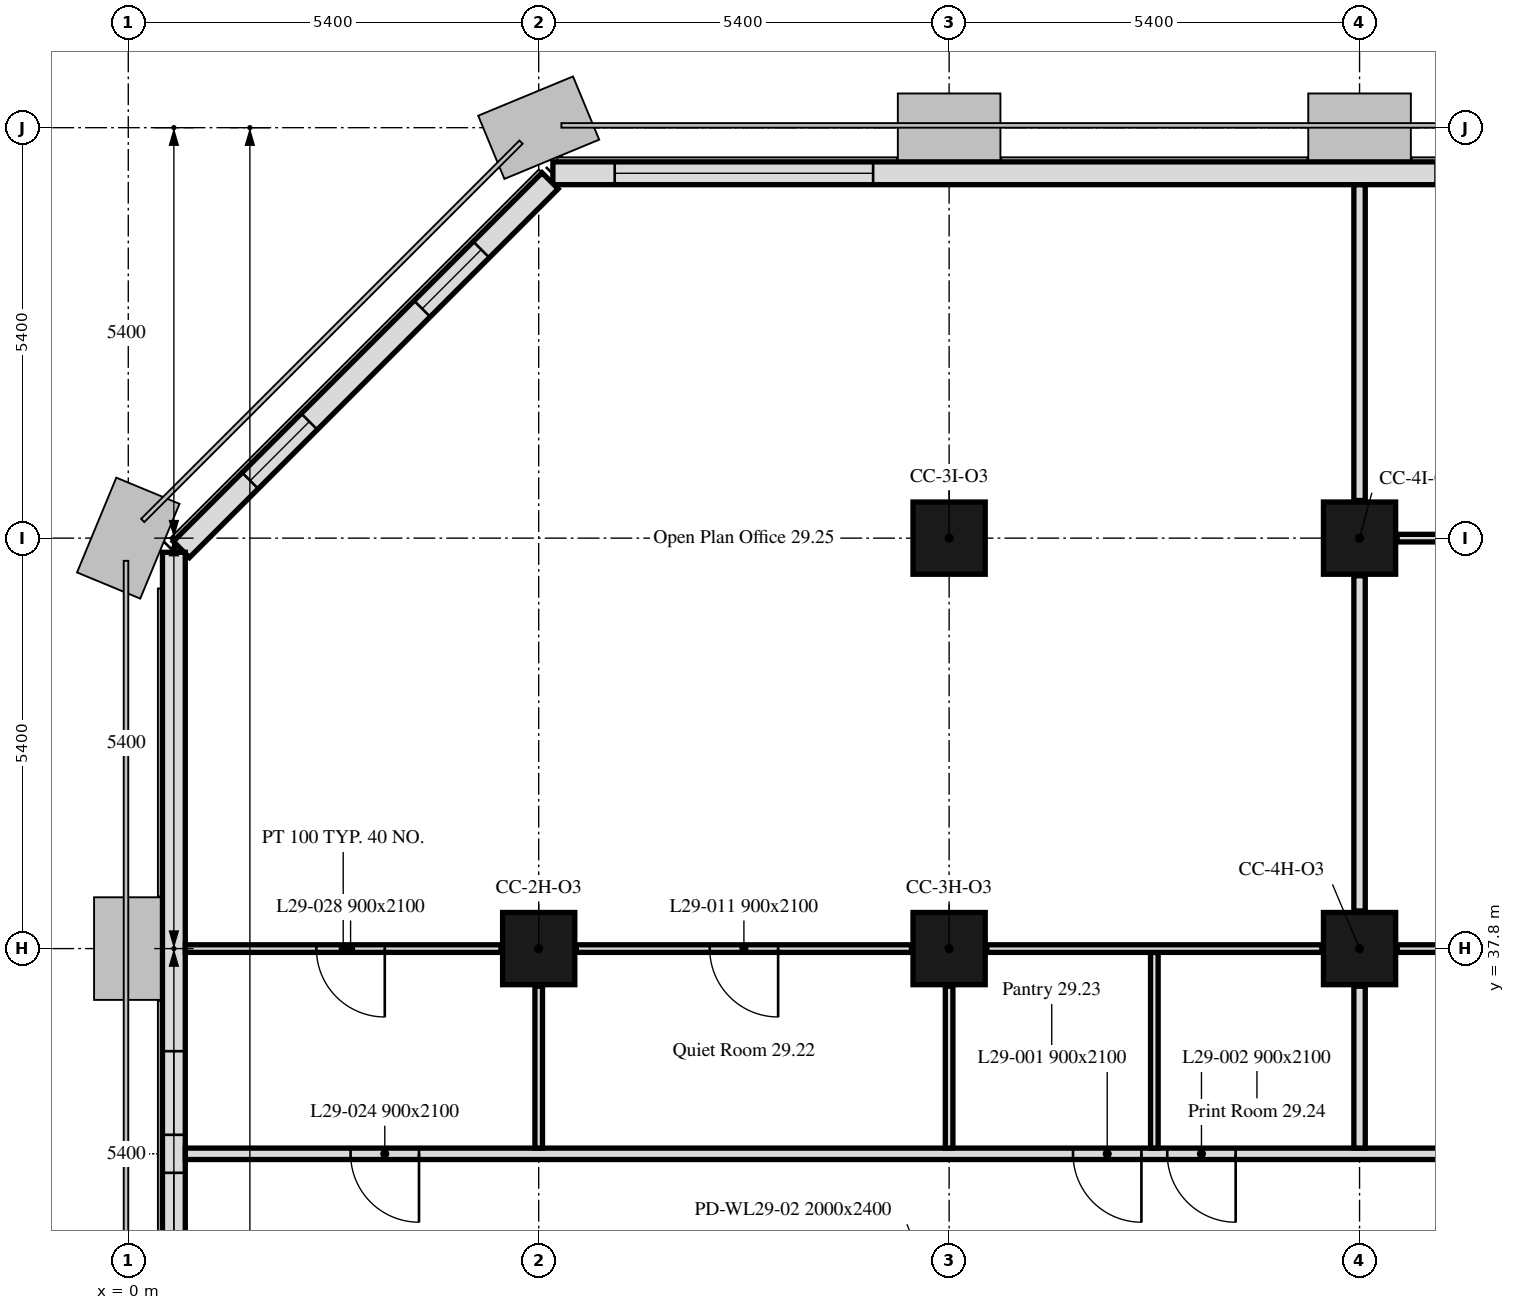
"""IFC4 building model, lengths in metres.
Left out: names, types, materials, properties, quantities, classifications, styles, units other than length and angle.
Written with IfcOpenShell. Run it as: python <this file> out.ifc"""

import sys

from ifc_helpers import new_model, si_unit, direction, frame, frame_2d, origin, origin_2d, place, context, subcontext, project, spatial, rectangle, extrude, element, fill, save


model = new_model("IFC4")
c1 = context("Model", 3, precision=1e-05, world=origin(), true_north=direction((0.0, 1.0)))
c2 = subcontext(c1, "Body", "Model", "MODEL_VIEW")
j1 = project(units=[si_unit("LENGTHUNIT", "METRE"), si_unit("PLANEANGLEUNIT", "RADIAN")], contexts=[c1])
p1 = place(None, origin())
s1 = spatial("IfcSite", under=j1, at=p1, CompositionType="ELEMENT")
p2 = place(p1, origin())
s2 = spatial("IfcBuilding", under=s1, at=p2, CompositionType="ELEMENT")
p3 = place(p2, frame((0.0, 0.0, 122.0)))
s3 = spatial("IfcBuildingStorey", under=s2, at=p3, CompositionType="ELEMENT", Elevation=122.0)
for number, where, z_axis, x_axis in (
    (1, (5.4, 37.8, 0.0), (0.0, 0.0, 1.0), (1.0, 0.0, 0.0)),
    (2, (10.8, 37.8, 0.0), (0.0, 0.0, 1.0), (1.0, 0.0, 0.0)),
    (3, (16.2, 37.8, 0.0), (0.0, 0.0, 1.0), (1.0, 0.0, 0.0)),
    (4, (10.8, 43.2, 0.0), (0.0, 0.0, 1.0), (1.0, 0.0, 0.0)),
    (5, (16.2, 43.2, 0.0), (0.0, 0.0, 1.0), (1.0, 0.0, 0.0)),
):
    element("IfcColumn", number, at=place(p3, frame(where, z_axis=z_axis, x_axis=x_axis)), inside=s3, PredefinedType="COLUMN", context=c2, shape_type="SweptSolid", body=[
        extrude(rectangle(XDim=0.95, YDim=0.95, at=origin_2d()), origin(), (0.0, 0.0, 1.0), 3.3),
    ])
p4 = place(p3, frame((37.614, 48.0, 0.0), z_axis=(0.0, 0.0, 1.0), x_axis=(-1.0, 0.0, 0.0)))
e6 = element("IfcWall", 6, at=p4, inside=s3, PredefinedType="SOLIDWALL", context=c2, shape_type="SweptSolid", body=[
    extrude(rectangle(XDim=32.027, YDim=0.3, at=frame_2d((16.014, 0.0))), origin(), (0.0, 0.0, 1.0), 3.3),
])
p5 = place(p4, frame((6.214, 0.0, 0.9)))
e7 = element("IfcOpeningElement", 7, at=p5, cuts=e6, PredefinedType="OPENING", context=c2, shape_type="SweptSolid", body=[
    extrude(rectangle(XDim=3.4, YDim=1.7, at=frame_2d((1.7, 0.85))), frame((0.0, 0.16, 0.0), z_axis=(0.0, -1.0, 0.0), x_axis=(1.0, 0.0, 0.0)), (0.0, 0.0, 1.0), 0.32),
])
p6 = place(p4, frame((17.014, 0.0, 0.9)))
e8 = element("IfcOpeningElement", 8, at=p6, cuts=e6, PredefinedType="OPENING", context=c2, shape_type="SweptSolid", body=[
    extrude(rectangle(XDim=3.4, YDim=1.7, at=frame_2d((1.7, 0.85))), frame((0.0, 0.16, 0.0), z_axis=(0.0, -1.0, 0.0), x_axis=(1.0, 0.0, 0.0)), (0.0, 0.0, 1.0), 0.32),
])
p7 = place(p4, frame((27.814, 0.0, 0.9)))
e9 = element("IfcOpeningElement", 9, at=p7, cuts=e6, PredefinedType="OPENING", context=c2, shape_type="SweptSolid", body=[
    extrude(rectangle(XDim=3.4, YDim=1.7, at=frame_2d((1.7, 0.85))), frame((0.0, 0.16, 0.0), z_axis=(0.0, -1.0, 0.0), x_axis=(1.0, 0.0, 0.0)), (0.0, 0.0, 1.0), 0.32),
])
p8 = place(p3, frame((5.55, 47.901, 0.0), z_axis=(0.0, 0.0, 1.0), x_axis=(-0.707106781187, -0.707106781187, 0.0)))
e10 = element("IfcWall", 10, at=p8, inside=s3, PredefinedType="SOLIDWALL", context=c2, shape_type="SweptSolid", body=[
    extrude(rectangle(XDim=6.86, YDim=0.3, at=frame_2d((3.43, 0.0))), origin(), (0.0, 0.0, 1.0), 3.3),
])
p9 = place(p8, frame((1.28, 0.0, 0.9)))
e11 = element("IfcOpeningElement", 11, at=p9, cuts=e10, PredefinedType="OPENING", context=c2, shape_type="SweptSolid", body=[
    extrude(rectangle(XDim=1.1, YDim=1.7, at=frame_2d((0.55, 0.85))), frame((0.0, 0.16, 0.0), z_axis=(0.0, -1.0, 0.0), x_axis=(1.0, 0.0, 0.0)), (0.0, 0.0, 1.0), 0.32),
])
p10 = place(p8, frame((4.48, 0.0, 0.9)))
e12 = element("IfcOpeningElement", 12, at=p10, cuts=e10, PredefinedType="OPENING", context=c2, shape_type="SweptSolid", body=[
    extrude(rectangle(XDim=1.1, YDim=1.7, at=frame_2d((0.55, 0.85))), frame((0.0, 0.16, 0.0), z_axis=(0.0, -1.0, 0.0), x_axis=(1.0, 0.0, 0.0)), (0.0, 0.0, 1.0), 0.32),
])
p11 = place(p3, frame((0.6, 43.014, 0.0), z_axis=(0.0, 0.0, 1.0), x_axis=(0.0, -1.0, 0.0)))
e13 = element("IfcWall", 13, at=p11, inside=s3, PredefinedType="SOLIDWALL", context=c2, shape_type="SweptSolid", body=[
    extrude(rectangle(XDim=32.027, YDim=0.3, at=frame_2d((16.014, 0.0))), origin(), (0.0, 0.0, 1.0), 3.3),
])
p12 = place(p11, frame((6.564, 0.0, 0.9)))
e14 = element("IfcOpeningElement", 14, at=p12, cuts=e13, PredefinedType="OPENING", context=c2, shape_type="SweptSolid", body=[
    extrude(rectangle(XDim=1.1, YDim=1.7, at=frame_2d((0.55, 0.85))), frame((0.0, 0.16, 0.0), z_axis=(0.0, -1.0, 0.0), x_axis=(1.0, 0.0, 0.0)), (0.0, 0.0, 1.0), 0.32),
])
p13 = place(p11, frame((8.164, 0.0, 0.9)))
e15 = element("IfcOpeningElement", 15, at=p13, cuts=e13, PredefinedType="OPENING", context=c2, shape_type="SweptSolid", body=[
    extrude(rectangle(XDim=1.1, YDim=1.7, at=frame_2d((0.55, 0.85))), frame((0.0, 0.16, 0.0), z_axis=(0.0, -1.0, 0.0), x_axis=(1.0, 0.0, 0.0)), (0.0, 0.0, 1.0), 0.32),
])
p14 = place(p11, frame((17.014, 0.0, 0.9)))
e16 = element("IfcOpeningElement", 16, at=p14, cuts=e13, PredefinedType="OPENING", context=c2, shape_type="SweptSolid", body=[
    extrude(rectangle(XDim=3.4, YDim=1.7, at=frame_2d((1.7, 0.85))), frame((0.0, 0.16, 0.0), z_axis=(0.0, -1.0, 0.0), x_axis=(1.0, 0.0, 0.0)), (0.0, 0.0, 1.0), 0.32),
])
p15 = place(p11, frame((28.164, 0.0, 0.9)))
e17 = element("IfcOpeningElement", 17, at=p15, cuts=e13, PredefinedType="OPENING", context=c2, shape_type="SweptSolid", body=[
    extrude(rectangle(XDim=1.1, YDim=1.7, at=frame_2d((0.55, 0.85))), frame((0.0, 0.16, 0.0), z_axis=(0.0, -1.0, 0.0), x_axis=(1.0, 0.0, 0.0)), (0.0, 0.0, 1.0), 0.32),
])
p16 = place(p11, frame((29.764, 0.0, 0.9)))
e18 = element("IfcOpeningElement", 18, at=p16, cuts=e13, PredefinedType="OPENING", context=c2, shape_type="SweptSolid", body=[
    extrude(rectangle(XDim=1.1, YDim=1.7, at=frame_2d((0.55, 0.85))), frame((0.0, 0.16, 0.0), z_axis=(0.0, -1.0, 0.0), x_axis=(1.0, 0.0, 0.0)), (0.0, 0.0, 1.0), 0.32),
])
p17 = place(p3, frame((42.449, 35.1, 0.0), z_axis=(0.0, 0.0, 1.0), x_axis=(-1.0, 0.0, 0.0)))
e19 = element("IfcWall", 19, at=p17, inside=s3, PredefinedType="PARTITIONING", context=c2, shape_type="SweptSolid", body=[
    extrude(rectangle(XDim=41.698, YDim=0.15, at=frame_2d((20.849, 0.0))), origin(), (0.0, 0.0, 1.0), 2.55),
])
p18 = place(p17, frame((29.119, 0.0, 0.0)))
e20 = element("IfcOpeningElement", 20, at=p18, cuts=e19, PredefinedType="OPENING", context=c2, shape_type="SweptSolid", body=[
    extrude(rectangle(XDim=0.9, YDim=2.1, at=frame_2d((0.45, 1.05))), frame((0.0, 0.075, 0.0), z_axis=(0.0, -1.0, 0.0), x_axis=(1.0, 0.0, 0.0)), (0.0, 0.0, 1.0), 0.15),
])
p19 = place(p17, frame((27.879, 0.0, 0.0)))
e21 = element("IfcOpeningElement", 21, at=p19, cuts=e19, PredefinedType="OPENING", context=c2, shape_type="SweptSolid", body=[
    extrude(rectangle(XDim=0.9, YDim=2.1, at=frame_2d((0.45, 1.05))), frame((0.0, 0.075, 0.0), z_axis=(0.0, -1.0, 0.0), x_axis=(1.0, 0.0, 0.0)), (0.0, 0.0, 1.0), 0.15),
])
p20 = place(p17, frame((18.319, 0.0, 0.0)))
e22 = element("IfcOpeningElement", 22, at=p20, cuts=e19, PredefinedType="OPENING", context=c2, shape_type="SweptSolid", body=[
    extrude(rectangle(XDim=0.9, YDim=2.1, at=frame_2d((0.45, 1.05))), frame((0.0, 0.075, 0.0), z_axis=(0.0, -1.0, 0.0), x_axis=(1.0, 0.0, 0.0)), (0.0, 0.0, 1.0), 0.15),
])
p21 = place(p17, frame((38.624, 0.0, 0.0)))
e23 = element("IfcOpeningElement", 23, at=p21, cuts=e19, PredefinedType="OPENING", context=c2, shape_type="SweptSolid", body=[
    extrude(rectangle(XDim=0.9, YDim=2.1, at=frame_2d((0.45, 1.05))), frame((0.0, 0.075, 0.0), z_axis=(0.0, -1.0, 0.0), x_axis=(1.0, 0.0, 0.0)), (0.0, 0.0, 1.0), 0.15),
])
p22 = place(p17, frame((23.099, 0.0, 0.0)))
e24 = element("IfcOpeningElement", 24, at=p22, cuts=e19, PredefinedType="OPENING", context=c2, shape_type="SweptSolid", body=[
    extrude(rectangle(XDim=0.9, YDim=2.1, at=frame_2d((0.45, 1.05))), frame((0.0, 0.075, 0.0), z_axis=(0.0, -1.0, 0.0), x_axis=(1.0, 0.0, 0.0)), (0.0, 0.0, 1.0), 0.15),
])
p23 = place(p17, frame((6.899, 0.0, 0.0)))
e25 = element("IfcOpeningElement", 25, at=p23, cuts=e19, PredefinedType="OPENING", context=c2, shape_type="SweptSolid", body=[
    extrude(rectangle(XDim=0.9, YDim=2.1, at=frame_2d((0.45, 1.05))), frame((0.0, 0.075, 0.0), z_axis=(0.0, -1.0, 0.0), x_axis=(1.0, 0.0, 0.0)), (0.0, 0.0, 1.0), 0.15),
])
p24 = place(p3, frame((4.905, 37.8, 0.0), z_axis=(0.0, 0.0, 1.0), x_axis=(-1.0, 0.0, 0.0)))
e26 = element("IfcWall", 26, at=p24, inside=s3, PredefinedType="PARTITIONING", context=c2, shape_type="SweptSolid", body=[
    extrude(rectangle(XDim=4.154, YDim=0.1, at=frame_2d((2.077, 0.0))), origin(), (0.0, 0.0, 1.0), 2.55),
])
p25 = place(p24, frame((1.53, 0.0, 0.0)))
e27 = element("IfcOpeningElement", 27, at=p25, cuts=e26, PredefinedType="OPENING", context=c2, shape_type="SweptSolid", body=[
    extrude(rectangle(XDim=0.9, YDim=2.1, at=frame_2d((0.45, 1.05))), frame((0.0, 0.05, 0.0), z_axis=(0.0, -1.0, 0.0), x_axis=(1.0, 0.0, 0.0)), (0.0, 0.0, 1.0), 0.1),
])
p26 = place(p3, frame((5.4, 35.175, 0.0), z_axis=(0.0, 0.0, 1.0), x_axis=(0.0, 1.0, 0.0)))
e28 = element("IfcWall", 28, at=p26, inside=s3, PredefinedType="PARTITIONING", context=c2, shape_type="SweptSolid", body=[
    extrude(rectangle(XDim=2.13, YDim=0.1, at=frame_2d((1.065, 0.0))), origin(), (0.0, 0.0, 1.0), 3.3),
])
p27 = place(p3, frame((10.8, 35.175, 0.0), z_axis=(0.0, 0.0, 1.0), x_axis=(0.0, 1.0, 0.0)))
e29 = element("IfcWall", 29, at=p27, inside=s3, PredefinedType="PARTITIONING", context=c2, shape_type="SweptSolid", body=[
    extrude(rectangle(XDim=2.13, YDim=0.1, at=frame_2d((1.065, 0.0))), origin(), (0.0, 0.0, 1.0), 2.55),
])
p28 = place(p3, frame((10.305, 37.8, 0.0), z_axis=(0.0, 0.0, 1.0), x_axis=(-1.0, 0.0, 0.0)))
e30 = element("IfcWall", 30, at=p28, inside=s3, PredefinedType="PARTITIONING", context=c2, shape_type="SweptSolid", body=[
    extrude(rectangle(XDim=4.41, YDim=0.1, at=frame_2d((2.205, 0.0))), origin(), (0.0, 0.0, 1.0), 2.55),
])
p29 = place(p28, frame((1.755, 0.0, 0.0)))
e31 = element("IfcOpeningElement", 31, at=p29, cuts=e30, PredefinedType="OPENING", context=c2, shape_type="SweptSolid", body=[
    extrude(rectangle(XDim=0.9, YDim=2.1, at=frame_2d((0.45, 1.05))), frame((0.0, 0.05, 0.0), z_axis=(0.0, -1.0, 0.0), x_axis=(1.0, 0.0, 0.0)), (0.0, 0.0, 1.0), 0.1),
])
p30 = place(p3, frame((13.5, 35.175, 0.0), z_axis=(0.0, 0.0, 1.0), x_axis=(0.0, 1.0, 0.0)))
e32 = element("IfcWall", 32, at=p30, inside=s3, PredefinedType="PARTITIONING", context=c2, shape_type="SweptSolid", body=[
    extrude(rectangle(XDim=2.575, YDim=0.1, at=frame_2d((1.288, 0.0))), origin(), (0.0, 0.0, 1.0), 3.3),
])
p31 = place(p3, frame((16.2, 35.175, 0.0), z_axis=(0.0, 0.0, 1.0), x_axis=(0.0, 1.0, 0.0)))
e33 = element("IfcWall", 33, at=p31, inside=s3, PredefinedType="PARTITIONING", context=c2, shape_type="SweptSolid", body=[
    extrude(rectangle(XDim=2.13, YDim=0.15, at=frame_2d((1.065, 0.0))), origin(), (0.0, 0.0, 1.0), 2.55),
])
p32 = place(p3, frame((15.705, 37.8, 0.0), z_axis=(0.0, 0.0, 1.0), x_axis=(-1.0, 0.0, 0.0)))
e34 = element("IfcWall", 34, at=p32, inside=s3, PredefinedType="PARTITIONING", context=c2, shape_type="SweptSolid", body=[
    extrude(rectangle(XDim=4.41, YDim=0.1, at=frame_2d((2.205, 0.0))), origin(), (0.0, 0.0, 1.0), 2.55),
])
p33 = place(p3, frame((16.2, 38.295, 0.0), z_axis=(0.0, 0.0, 1.0), x_axis=(0.0, 1.0, 0.0)))
e35 = element("IfcWall", 35, at=p33, inside=s3, PredefinedType="PARTITIONING", context=c2, shape_type="SweptSolid", body=[
    extrude(rectangle(XDim=4.41, YDim=0.15, at=frame_2d((2.205, 0.0))), origin(), (0.0, 0.0, 1.0), 2.55),
])
p34 = place(p3, frame((16.2, 43.695, 0.0), z_axis=(0.0, 0.0, 1.0), x_axis=(0.0, 1.0, 0.0)))
e36 = element("IfcWall", 36, at=p34, inside=s3, PredefinedType="PARTITIONING", context=c2, shape_type="SweptSolid", body=[
    extrude(rectangle(XDim=4.154, YDim=0.15, at=frame_2d((2.077, 0.0))), origin(), (0.0, 0.0, 1.0), 2.55),
])
p35 = place(p3, frame((21.105, 37.8, 0.0), z_axis=(0.0, 0.0, 1.0), x_axis=(-1.0, 0.0, 0.0)))
e37 = element("IfcWall", 37, at=p35, inside=s3, PredefinedType="PARTITIONING", context=c2, shape_type="SweptSolid", body=[
    extrude(rectangle(XDim=4.41, YDim=0.1, at=frame_2d((2.205, 0.0))), origin(), (0.0, 0.0, 1.0), 3.3),
])
p36 = place(p35, frame((1.755, 0.0, 0.0)))
e38 = element("IfcOpeningElement", 38, at=p36, cuts=e37, PredefinedType="OPENING", context=c2, shape_type="SweptSolid", body=[
    extrude(rectangle(XDim=0.9, YDim=2.1, at=frame_2d((0.45, 1.05))), frame((0.0, 0.05, 0.0), z_axis=(0.0, -1.0, 0.0), x_axis=(1.0, 0.0, 0.0)), (0.0, 0.0, 1.0), 0.1),
])
p37 = place(p3, frame((21.105, 43.2, 0.0), z_axis=(0.0, 0.0, 1.0), x_axis=(-1.0, 0.0, 0.0)))
e39 = element("IfcWall", 39, at=p37, inside=s3, PredefinedType="PARTITIONING", context=c2, shape_type="SweptSolid", body=[
    extrude(rectangle(XDim=4.41, YDim=0.1, at=frame_2d((2.205, 0.0))), origin(), (0.0, 0.0, 1.0), 3.3),
])
p38 = place(p37, frame((1.755, 0.0, 0.0)))
e40 = element("IfcOpeningElement", 40, at=p38, cuts=e39, PredefinedType="OPENING", context=c2, shape_type="SweptSolid", body=[
    extrude(rectangle(XDim=0.9, YDim=2.1, at=frame_2d((0.45, 1.05))), frame((0.0, 0.05, 0.0), z_axis=(0.0, -1.0, 0.0), x_axis=(1.0, 0.0, 0.0)), (0.0, 0.0, 1.0), 0.1),
])
p39 = place(p7, origin())
e41 = element("IfcWindow", 41, at=p39, inside=s3, PartitioningType="SINGLE_PANEL", PredefinedType="WINDOW", context=c2, shape_type="SweptSolid", body=[
    extrude(rectangle(XDim=3.4, YDim=1.7, at=frame_2d((1.7, 0.85))), frame((0.0, 0.03, 0.0), z_axis=(0.0, -1.0, 0.0), x_axis=(1.0, 0.0, 0.0)), (0.0, 0.0, 1.0), 0.06),
])
fill(e9, e41)
p40 = place(p9, origin())
e42 = element("IfcWindow", 42, at=p40, inside=s3, PartitioningType="SINGLE_PANEL", PredefinedType="WINDOW", context=c2, shape_type="SweptSolid", body=[
    extrude(rectangle(XDim=1.1, YDim=1.7, at=frame_2d((0.55, 0.85))), frame((0.0, 0.03, 0.0), z_axis=(0.0, -1.0, 0.0), x_axis=(1.0, 0.0, 0.0)), (0.0, 0.0, 1.0), 0.06),
])
fill(e11, e42)
p41 = place(p10, origin())
e43 = element("IfcWindow", 43, at=p41, inside=s3, PartitioningType="SINGLE_PANEL", PredefinedType="WINDOW", context=c2, shape_type="SweptSolid", body=[
    extrude(rectangle(XDim=1.1, YDim=1.7, at=frame_2d((0.55, 0.85))), frame((0.0, 0.03, 0.0), z_axis=(0.0, -1.0, 0.0), x_axis=(1.0, 0.0, 0.0)), (0.0, 0.0, 1.0), 0.06),
])
fill(e12, e43)
p42 = place(p12, origin())
e44 = element("IfcWindow", 44, at=p42, inside=s3, PartitioningType="SINGLE_PANEL", PredefinedType="WINDOW", context=c2, shape_type="SweptSolid", body=[
    extrude(rectangle(XDim=1.1, YDim=1.7, at=frame_2d((0.55, 0.85))), frame((0.0, 0.03, 0.0), z_axis=(0.0, -1.0, 0.0), x_axis=(1.0, 0.0, 0.0)), (0.0, 0.0, 1.0), 0.06),
])
fill(e14, e44)
p43 = place(p13, origin())
e45 = element("IfcWindow", 45, at=p43, inside=s3, PartitioningType="SINGLE_PANEL", PredefinedType="WINDOW", context=c2, shape_type="SweptSolid", body=[
    extrude(rectangle(XDim=1.1, YDim=1.7, at=frame_2d((0.55, 0.85))), frame((0.0, 0.03, 0.0), z_axis=(0.0, -1.0, 0.0), x_axis=(1.0, 0.0, 0.0)), (0.0, 0.0, 1.0), 0.06),
])
fill(e15, e45)
p44 = place(p18, origin())
e46 = element("IfcDoor", 46, at=p44, inside=s3, OperationType="SINGLE_SWING_LEFT", PredefinedType="DOOR", context=c2, shape_type="SweptSolid", body=[
    extrude(rectangle(XDim=0.9, YDim=2.1, at=frame_2d((0.45, 1.05))), frame((0.0, 0.025, 0.0), z_axis=(0.0, -1.0, 0.0), x_axis=(1.0, 0.0, 0.0)), (0.0, 0.0, 1.0), 0.05),
])
fill(e20, e46)
p45 = place(p19, origin())
e47 = element("IfcDoor", 47, at=p45, inside=s3, OperationType="SINGLE_SWING_LEFT", PredefinedType="DOOR", context=c2, shape_type="SweptSolid", body=[
    extrude(rectangle(XDim=0.9, YDim=2.1, at=frame_2d((0.45, 1.05))), frame((0.0, 0.025, 0.0), z_axis=(0.0, -1.0, 0.0), x_axis=(1.0, 0.0, 0.0)), (0.0, 0.0, 1.0), 0.05),
])
fill(e21, e47)
p46 = place(p29, origin())
e48 = element("IfcDoor", 48, at=p46, inside=s3, OperationType="SINGLE_SWING_LEFT", PredefinedType="DOOR", context=c2, shape_type="SweptSolid", body=[
    extrude(rectangle(XDim=0.9, YDim=2.1, at=frame_2d((0.45, 1.05))), frame((0.0, 0.025, 0.0), z_axis=(0.0, -1.0, 0.0), x_axis=(1.0, 0.0, 0.0)), (0.0, 0.0, 1.0), 0.05),
])
fill(e31, e48)
p47 = place(p21, origin())
e49 = element("IfcDoor", 49, at=p47, inside=s3, OperationType="SINGLE_SWING_LEFT", PredefinedType="DOOR", context=c2, shape_type="SweptSolid", body=[
    extrude(rectangle(XDim=0.9, YDim=2.1, at=frame_2d((0.45, 1.05))), frame((0.0, 0.025, 0.0), z_axis=(0.0, -1.0, 0.0), x_axis=(1.0, 0.0, 0.0)), (0.0, 0.0, 1.0), 0.05),
])
fill(e23, e49)
p48 = place(p25, origin())
e50 = element("IfcDoor", 50, at=p48, inside=s3, OperationType="SINGLE_SWING_RIGHT", PredefinedType="DOOR", context=c2, shape_type="SweptSolid", body=[
    extrude(rectangle(XDim=0.9, YDim=2.1, at=frame_2d((0.45, 1.05))), frame((0.0, 0.025, 0.0), z_axis=(0.0, -1.0, 0.0), x_axis=(1.0, 0.0, 0.0)), (0.0, 0.0, 1.0), 0.05),
])
fill(e27, e50)
save(model, sys.argv[1])
